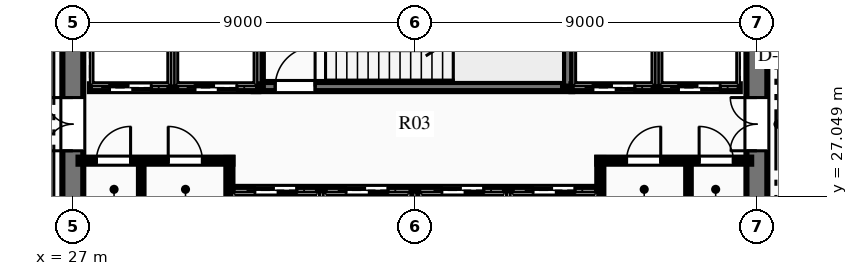
"""IFC4 building model, lengths in metres.
Left out: names, types, materials, properties, quantities, classifications, styles, units other than length and angle.
Written with IfcOpenShell. Run it as: python <this file> out.ifc"""

import sys

from ifc_helpers import new_model, si_unit, direction, frame, frame_2d, origin, place, context, subcontext, project, spatial, rectangle, extrude, element, fill, save


model = new_model("IFC4")
c1 = context("Model", 3, precision=1e-05, world=origin(), true_north=direction((0.0, 1.0)))
c2 = subcontext(c1, "Body", "Model", "MODEL_VIEW")
j1 = project(units=[si_unit("LENGTHUNIT", "METRE"), si_unit("PLANEANGLEUNIT", "RADIAN")], contexts=[c1])
p1 = place(None, origin())
s1 = spatial("IfcSite", under=j1, at=p1, CompositionType="ELEMENT")
p2 = place(p1, origin())
s2 = spatial("IfcBuilding", under=s1, at=p2, CompositionType="ELEMENT")
p3 = place(p2, frame((0.0, 0.0, 85.95)))
s3 = spatial("IfcBuildingStorey", under=s2, at=p3, CompositionType="ELEMENT", Elevation=85.95)
p4 = place(p3, frame((27.0, 18.275, 0.0), z_axis=(0.0, 0.0, 1.0), x_axis=(0.0, 1.0, 0.0)))
e1 = element("IfcWall", 1, at=p4, inside=s3, PredefinedType="SHEAR", context=c2, shape_type="SweptSolid", body=[
    extrude(rectangle(XDim=15.45, YDim=0.55, at=frame_2d((7.725, 0.0))), origin(), (0.0, 0.0, 1.0), 4.5),
])
p5 = place(p4, frame((9.965, 0.0, 0.0)))
e2 = element("IfcOpeningElement", 2, at=p5, cuts=e1, PredefinedType="OPENING", context=c2, shape_type="SweptSolid", body=[
    extrude(rectangle(XDim=1.4, YDim=2.2, at=frame_2d((0.7, 1.1))), frame((0.0, 0.285, 0.0), z_axis=(0.0, -1.0, 0.0), x_axis=(1.0, 0.0, 0.0)), (0.0, 0.0, 1.0), 0.57),
])
p6 = place(p3, frame((45.0, 18.275, 0.0), z_axis=(0.0, 0.0, 1.0), x_axis=(0.0, 1.0, 0.0)))
e3 = element("IfcWall", 3, at=p6, inside=s3, PredefinedType="SHEAR", context=c2, shape_type="SweptSolid", body=[
    extrude(rectangle(XDim=15.45, YDim=0.55, at=frame_2d((7.725, 0.0))), origin(), (0.0, 0.0, 1.0), 4.5),
])
p7 = place(p6, frame((9.965, 0.0, 0.0)))
e4 = element("IfcOpeningElement", 4, at=p7, cuts=e3, PredefinedType="OPENING", context=c2, shape_type="SweptSolid", body=[
    extrude(rectangle(XDim=1.4, YDim=2.2, at=frame_2d((0.7, 1.1))), frame((0.0, 0.285, 0.0), z_axis=(0.0, -1.0, 0.0), x_axis=(1.0, 0.0, 0.0)), (0.0, 0.0, 1.0), 0.57),
])
p8 = place(p3, frame((31.76, 29.93, 0.0), z_axis=(0.0, 0.0, 1.0), x_axis=(1.0, 0.0, 0.0)))
e5 = element("IfcWall", 5, at=p8, inside=s3, PredefinedType="SHEAR", context=c2, shape_type="SweptSolid", body=[
    extrude(rectangle(XDim=8.38, YDim=0.24, at=frame_2d((4.19, 0.0))), origin(), (0.0, 0.0, 1.0), 4.5),
])
p9 = place(p8, frame((0.565, 0.0, 0.0)))
e6 = element("IfcOpeningElement", 6, at=p9, cuts=e5, PredefinedType="OPENING", context=c2, shape_type="SweptSolid", body=[
    extrude(rectangle(XDim=1.05, YDim=2.15, at=frame_2d((0.525, 1.075))), frame((0.0, 0.13, 0.0), z_axis=(0.0, -1.0, 0.0), x_axis=(1.0, 0.0, 0.0)), (0.0, 0.0, 1.0), 0.26),
])
p10 = place(p3, frame((31.88, 29.93, 0.0), z_axis=(0.0, 0.0, 1.0), x_axis=(0.0, 1.0, 0.0)))
e7 = element("IfcWall", 7, at=p10, inside=s3, PredefinedType="SHEAR", context=c2, shape_type="SweptSolid", body=[
    extrude(rectangle(XDim=3.79, YDim=0.24, at=frame_2d((1.895, 0.0))), origin(), (0.0, 0.0, 1.0), 4.5),
])
p11 = place(p3, frame((40.02, 29.93, 0.0), z_axis=(0.0, 0.0, 1.0), x_axis=(0.0, 1.0, 0.0)))
e8 = element("IfcWall", 8, at=p11, inside=s3, PredefinedType="SHEAR", context=c2, shape_type="SweptSolid", body=[
    extrude(rectangle(XDim=3.85, YDim=0.24, at=frame_2d((1.925, 0.0))), origin(), (0.0, 0.0, 1.0), 4.5),
])
p12 = place(p3, frame((27.15, 27.98, 0.0), z_axis=(0.0, 0.0, 1.0), x_axis=(1.0, 0.0, 0.0)))
e9 = element("IfcWall", 9, at=p12, inside=s3, PredefinedType="PARTITIONING", context=c2, shape_type="SweptSolid", body=[
    extrude(rectangle(XDim=4.05, YDim=0.16, at=frame_2d((2.025, 0.0))), origin(), (0.0, 0.0, 1.0), 4.2),
])
p13 = place(p12, frame((0.47, 0.0, 0.0)))
e10 = element("IfcOpeningElement", 10, at=p13, cuts=e9, PredefinedType="OPENING", context=c2, shape_type="SweptSolid", body=[
    extrude(rectangle(XDim=0.9, YDim=2.15, at=frame_2d((0.45, 1.075))), frame((0.0, 0.09, 0.0), z_axis=(0.0, -1.0, 0.0), x_axis=(1.0, 0.0, 0.0)), (0.0, 0.0, 1.0), 0.18),
])
p14 = place(p12, frame((2.36, 0.0, 0.0)))
e11 = element("IfcOpeningElement", 11, at=p14, cuts=e9, PredefinedType="OPENING", context=c2, shape_type="SweptSolid", body=[
    extrude(rectangle(XDim=0.9, YDim=2.15, at=frame_2d((0.45, 1.075))), frame((0.0, 0.09, 0.0), z_axis=(0.0, -1.0, 0.0), x_axis=(1.0, 0.0, 0.0)), (0.0, 0.0, 1.0), 0.18),
])
p15 = place(p3, frame((31.12, 26.54, 0.0), z_axis=(0.0, 0.0, 1.0), x_axis=(0.0, 1.0, 0.0)))
e12 = element("IfcWall", 12, at=p15, inside=s3, PredefinedType="PARTITIONING", context=c2, shape_type="SweptSolid", body=[
    extrude(rectangle(XDim=1.51, YDim=0.16, at=frame_2d((0.755, 0.0))), origin(), (0.0, 0.0, 1.0), 4.2),
])
p16 = place(p3, frame((40.8, 27.98, 0.0), z_axis=(0.0, 0.0, 1.0), x_axis=(1.0, 0.0, 0.0)))
e13 = element("IfcWall", 13, at=p16, inside=s3, PredefinedType="PARTITIONING", context=c2, shape_type="SweptSolid", body=[
    extrude(rectangle(XDim=4.05, YDim=0.16, at=frame_2d((2.025, 0.0))), origin(), (0.0, 0.0, 1.0), 4.2),
])
p17 = place(p16, frame((0.77, 0.0, 0.0)))
e14 = element("IfcOpeningElement", 14, at=p17, cuts=e13, PredefinedType="OPENING", context=c2, shape_type="SweptSolid", body=[
    extrude(rectangle(XDim=0.9, YDim=2.15, at=frame_2d((0.45, 1.075))), frame((0.0, 0.09, 0.0), z_axis=(0.0, -1.0, 0.0), x_axis=(1.0, 0.0, 0.0)), (0.0, 0.0, 1.0), 0.18),
])
p18 = place(p16, frame((2.68, 0.0, 0.0)))
e15 = element("IfcOpeningElement", 15, at=p18, cuts=e13, PredefinedType="OPENING", context=c2, shape_type="SweptSolid", body=[
    extrude(rectangle(XDim=0.9, YDim=2.15, at=frame_2d((0.45, 1.075))), frame((0.0, 0.09, 0.0), z_axis=(0.0, -1.0, 0.0), x_axis=(1.0, 0.0, 0.0)), (0.0, 0.0, 1.0), 0.18),
])
p19 = place(p3, frame((40.88, 26.54, 0.0), z_axis=(0.0, 0.0, 1.0), x_axis=(0.0, 1.0, 0.0)))
e16 = element("IfcWall", 16, at=p19, inside=s3, PredefinedType="PARTITIONING", context=c2, shape_type="SweptSolid", body=[
    extrude(rectangle(XDim=1.51, YDim=0.16, at=frame_2d((0.755, 0.0))), origin(), (0.0, 0.0, 1.0), 4.2),
])
for number, where, z_axis, x_axis in (
    (17, (28.8, 26.54, 0.0), (0.0, 0.0, 1.0), (0.0, 1.0, 0.0)),
    (18, (43.2, 26.54, 0.0), (0.0, 0.0, 1.0), (0.0, 1.0, 0.0)),
):
    element("IfcWall", number, at=place(p3, frame(where, z_axis=z_axis, x_axis=x_axis)), inside=s3, PredefinedType="PARTITIONING", context=c2, shape_type="SweptSolid", body=[
        extrude(rectangle(XDim=1.44, YDim=0.12, at=frame_2d((0.72, 0.0))), origin(), (0.0, 0.0, 1.0), 4.2),
    ])
p20 = place(p3, frame((27.45, 29.9, 0.0), z_axis=(0.0, 0.0, 1.0), x_axis=(1.0, 0.0, 0.0)))
e19 = element("IfcWall", 19, at=p20, inside=s3, PredefinedType="PARTITIONING", context=c2, shape_type="SweptSolid", body=[
    extrude(rectangle(XDim=4.43, YDim=0.18, at=frame_2d((2.215, 0.0))), origin(), (0.0, 0.0, 1.0), 4.2),
])
p21 = place(p20, frame((0.515, 0.0, 0.0)))
e20 = element("IfcOpeningElement", 20, at=p21, cuts=e19, PredefinedType="OPENING", context=c2, shape_type="SweptSolid", body=[
    extrude(rectangle(XDim=1.1, YDim=2.15, at=frame_2d((0.55, 1.075))), frame((0.0, 0.1, 0.0), z_axis=(0.0, -1.0, 0.0), x_axis=(1.0, 0.0, 0.0)), (0.0, 0.0, 1.0), 0.2),
])
p22 = place(p20, frame((2.765, 0.0, 0.0)))
e21 = element("IfcOpeningElement", 21, at=p22, cuts=e19, PredefinedType="OPENING", context=c2, shape_type="SweptSolid", body=[
    extrude(rectangle(XDim=1.1, YDim=2.15, at=frame_2d((0.55, 1.075))), frame((0.0, 0.1, 0.0), z_axis=(0.0, -1.0, 0.0), x_axis=(1.0, 0.0, 0.0)), (0.0, 0.0, 1.0), 0.2),
])
p23 = place(p3, frame((29.63, 29.9, 0.0), z_axis=(0.0, 0.0, 1.0), x_axis=(0.0, 1.0, 0.0)))
e22 = element("IfcWall", 22, at=p23, inside=s3, PredefinedType="PARTITIONING", context=c2, shape_type="SweptSolid", body=[
    extrude(rectangle(XDim=3.75, YDim=0.18, at=frame_2d((1.875, 0.0))), origin(), (0.0, 0.0, 1.0), 4.2),
])
p24 = place(p3, frame((40.12, 29.9, 0.0), z_axis=(0.0, 0.0, 1.0), x_axis=(1.0, 0.0, 0.0)))
e23 = element("IfcWall", 23, at=p24, inside=s3, PredefinedType="PARTITIONING", context=c2, shape_type="SweptSolid", body=[
    extrude(rectangle(XDim=4.43, YDim=0.18, at=frame_2d((2.215, 0.0))), origin(), (0.0, 0.0, 1.0), 4.2),
])
p25 = place(p24, frame((0.565, 0.0, 0.0)))
e24 = element("IfcOpeningElement", 24, at=p25, cuts=e23, PredefinedType="OPENING", context=c2, shape_type="SweptSolid", body=[
    extrude(rectangle(XDim=1.1, YDim=2.15, at=frame_2d((0.55, 1.075))), frame((0.0, 0.1, 0.0), z_axis=(0.0, -1.0, 0.0), x_axis=(1.0, 0.0, 0.0)), (0.0, 0.0, 1.0), 0.2),
])
p26 = place(p24, frame((2.815, 0.0, 0.0)))
e25 = element("IfcOpeningElement", 25, at=p26, cuts=e23, PredefinedType="OPENING", context=c2, shape_type="SweptSolid", body=[
    extrude(rectangle(XDim=1.1, YDim=2.15, at=frame_2d((0.55, 1.075))), frame((0.0, 0.1, 0.0), z_axis=(0.0, -1.0, 0.0), x_axis=(1.0, 0.0, 0.0)), (0.0, 0.0, 1.0), 0.2),
])
p27 = place(p3, frame((42.37, 29.9, 0.0), z_axis=(0.0, 0.0, 1.0), x_axis=(0.0, 1.0, 0.0)))
e26 = element("IfcWall", 26, at=p27, inside=s3, PredefinedType="PARTITIONING", context=c2, shape_type="SweptSolid", body=[
    extrude(rectangle(XDim=3.75, YDim=0.18, at=frame_2d((1.875, 0.0))), origin(), (0.0, 0.0, 1.0), 4.2),
])
p28 = place(p3, frame((31.2, 27.2, 0.0), z_axis=(0.0, 0.0, 1.0), x_axis=(1.0, 0.0, 0.0)))
e27 = element("IfcWall", 27, at=p28, inside=s3, PredefinedType="PARTITIONING", context=c2, shape_type="SweptSolid", body=[
    extrude(rectangle(XDim=9.6, YDim=0.18, at=frame_2d((4.8, 0.0))), origin(), (0.0, 0.0, 1.0), 4.2),
])
p29 = place(p28, frame((0.59, 0.0, 0.0)))
e28 = element("IfcOpeningElement", 28, at=p29, cuts=e27, PredefinedType="OPENING", context=c2, shape_type="SweptSolid", body=[
    extrude(rectangle(XDim=1.1, YDim=2.15, at=frame_2d((0.55, 1.075))), frame((0.0, 0.1, 0.0), z_axis=(0.0, -1.0, 0.0), x_axis=(1.0, 0.0, 0.0)), (0.0, 0.0, 1.0), 0.2),
])
p30 = place(p28, frame((2.99, 0.0, 0.0)))
e29 = element("IfcOpeningElement", 29, at=p30, cuts=e27, PredefinedType="OPENING", context=c2, shape_type="SweptSolid", body=[
    extrude(rectangle(XDim=1.1, YDim=2.15, at=frame_2d((0.55, 1.075))), frame((0.0, 0.1, 0.0), z_axis=(0.0, -1.0, 0.0), x_axis=(1.0, 0.0, 0.0)), (0.0, 0.0, 1.0), 0.2),
])
p31 = place(p28, frame((5.51, 0.0, 0.0)))
e30 = element("IfcOpeningElement", 30, at=p31, cuts=e27, PredefinedType="OPENING", context=c2, shape_type="SweptSolid", body=[
    extrude(rectangle(XDim=1.1, YDim=2.15, at=frame_2d((0.55, 1.075))), frame((0.0, 0.1, 0.0), z_axis=(0.0, -1.0, 0.0), x_axis=(1.0, 0.0, 0.0)), (0.0, 0.0, 1.0), 0.2),
])
p32 = place(p28, frame((7.91, 0.0, 0.0)))
e31 = element("IfcOpeningElement", 31, at=p32, cuts=e27, PredefinedType="OPENING", context=c2, shape_type="SweptSolid", body=[
    extrude(rectangle(XDim=1.1, YDim=2.15, at=frame_2d((0.55, 1.075))), frame((0.0, 0.1, 0.0), z_axis=(0.0, -1.0, 0.0), x_axis=(1.0, 0.0, 0.0)), (0.0, 0.0, 1.0), 0.2),
])
for number, where, z_axis, x_axis in (
    (32, (33.54, 25.3, 0.0), (0.0, 0.0, 1.0), (0.0, 1.0, 0.0)),
    (33, (36.0, 25.3, 0.0), (0.0, 0.0, 1.0), (0.0, 1.0, 0.0)),
    (34, (38.46, 25.3, 0.0), (0.0, 0.0, 1.0), (0.0, 1.0, 0.0)),
):
    element("IfcWall", number, at=place(p3, frame(where, z_axis=z_axis, x_axis=x_axis)), inside=s3, PredefinedType="PARTITIONING", context=c2, shape_type="SweptSolid", body=[
        extrude(rectangle(XDim=1.9, YDim=0.18, at=frame_2d((0.95, 0.0))), origin(), (0.0, 0.0, 1.0), 4.2),
    ])
p33 = place(p13, origin())
e35 = element("IfcDoor", 35, at=p33, inside=s3, OperationType="SINGLE_SWING_RIGHT", PredefinedType="DOOR", context=c2, shape_type="SweptSolid", body=[
    extrude(rectangle(XDim=0.9, YDim=2.15, at=frame_2d((0.45, 1.075))), frame((0.0, 0.025, 0.0), z_axis=(0.0, -1.0, 0.0), x_axis=(1.0, 0.0, 0.0)), (0.0, 0.0, 1.0), 0.05),
])
fill(e10, e35)
p34 = place(p14, origin())
e36 = element("IfcDoor", 36, at=p34, inside=s3, OperationType="SINGLE_SWING_LEFT", PredefinedType="DOOR", context=c2, shape_type="SweptSolid", body=[
    extrude(rectangle(XDim=0.9, YDim=2.15, at=frame_2d((0.45, 1.075))), frame((0.0, 0.025, 0.0), z_axis=(0.0, -1.0, 0.0), x_axis=(1.0, 0.0, 0.0)), (0.0, 0.0, 1.0), 0.05),
])
fill(e11, e36)
p35 = place(p17, origin())
e37 = element("IfcDoor", 37, at=p35, inside=s3, OperationType="SINGLE_SWING_RIGHT", PredefinedType="DOOR", context=c2, shape_type="SweptSolid", body=[
    extrude(rectangle(XDim=0.9, YDim=2.15, at=frame_2d((0.45, 1.075))), frame((0.0, 0.025, 0.0), z_axis=(0.0, -1.0, 0.0), x_axis=(1.0, 0.0, 0.0)), (0.0, 0.0, 1.0), 0.05),
])
fill(e14, e37)
p36 = place(p18, origin())
e38 = element("IfcDoor", 38, at=p36, inside=s3, OperationType="SINGLE_SWING_LEFT", PredefinedType="DOOR", context=c2, shape_type="SweptSolid", body=[
    extrude(rectangle(XDim=0.9, YDim=2.15, at=frame_2d((0.45, 1.075))), frame((0.0, 0.025, 0.0), z_axis=(0.0, -1.0, 0.0), x_axis=(1.0, 0.0, 0.0)), (0.0, 0.0, 1.0), 0.05),
])
fill(e15, e38)
p37 = place(p9, origin())
e39 = element("IfcDoor", 39, at=p37, inside=s3, OperationType="SINGLE_SWING_RIGHT", PredefinedType="DOOR", context=c2, shape_type="SweptSolid", body=[
    extrude(rectangle(XDim=1.05, YDim=2.15, at=frame_2d((0.525, 1.075))), frame((0.0, 0.025, 0.0), z_axis=(0.0, -1.0, 0.0), x_axis=(1.0, 0.0, 0.0)), (0.0, 0.0, 1.0), 0.05),
])
fill(e6, e39)
p38 = place(p5, origin())
e40 = element("IfcDoor", 40, at=p38, inside=s3, OperationType="DOUBLE_DOOR_SINGLE_SWING", PredefinedType="DOOR", context=c2, shape_type="SweptSolid", body=[
    extrude(rectangle(XDim=1.4, YDim=2.2, at=frame_2d((0.7, 1.1))), frame((0.0, 0.025, 0.0), z_axis=(0.0, -1.0, 0.0), x_axis=(1.0, 0.0, 0.0)), (0.0, 0.0, 1.0), 0.05),
])
fill(e2, e40)
p39 = place(p7, origin())
e41 = element("IfcDoor", 41, at=p39, inside=s3, OperationType="DOUBLE_DOOR_SINGLE_SWING", PredefinedType="DOOR", context=c2, shape_type="SweptSolid", body=[
    extrude(rectangle(XDim=1.4, YDim=2.2, at=frame_2d((0.7, 1.1))), frame((0.0, 0.025, 0.0), z_axis=(0.0, -1.0, 0.0), x_axis=(1.0, 0.0, 0.0)), (0.0, 0.0, 1.0), 0.05),
])
fill(e4, e41)
p40 = place(p21, origin())
e42 = element("IfcDoor", 42, at=p40, inside=s3, OperationType="SLIDING_TO_LEFT", PredefinedType="DOOR", context=c2, shape_type="SweptSolid", body=[
    extrude(rectangle(XDim=1.1, YDim=2.15, at=frame_2d((0.55, 1.075))), frame((0.0, 0.025, 0.0), z_axis=(0.0, -1.0, 0.0), x_axis=(1.0, 0.0, 0.0)), (0.0, 0.0, 1.0), 0.05),
])
fill(e20, e42)
p41 = place(p22, origin())
e43 = element("IfcDoor", 43, at=p41, inside=s3, OperationType="SLIDING_TO_LEFT", PredefinedType="DOOR", context=c2, shape_type="SweptSolid", body=[
    extrude(rectangle(XDim=1.1, YDim=2.15, at=frame_2d((0.55, 1.075))), frame((0.0, 0.025, 0.0), z_axis=(0.0, -1.0, 0.0), x_axis=(1.0, 0.0, 0.0)), (0.0, 0.0, 1.0), 0.05),
])
fill(e21, e43)
p42 = place(p25, origin())
e44 = element("IfcDoor", 44, at=p42, inside=s3, OperationType="SLIDING_TO_LEFT", PredefinedType="DOOR", context=c2, shape_type="SweptSolid", body=[
    extrude(rectangle(XDim=1.1, YDim=2.15, at=frame_2d((0.55, 1.075))), frame((0.0, 0.025, 0.0), z_axis=(0.0, -1.0, 0.0), x_axis=(1.0, 0.0, 0.0)), (0.0, 0.0, 1.0), 0.05),
])
fill(e24, e44)
p43 = place(p26, origin())
e45 = element("IfcDoor", 45, at=p43, inside=s3, OperationType="SLIDING_TO_LEFT", PredefinedType="DOOR", context=c2, shape_type="SweptSolid", body=[
    extrude(rectangle(XDim=1.1, YDim=2.15, at=frame_2d((0.55, 1.075))), frame((0.0, 0.025, 0.0), z_axis=(0.0, -1.0, 0.0), x_axis=(1.0, 0.0, 0.0)), (0.0, 0.0, 1.0), 0.05),
])
fill(e25, e45)
p44 = place(p29, origin())
e46 = element("IfcDoor", 46, at=p44, inside=s3, OperationType="SLIDING_TO_LEFT", PredefinedType="DOOR", context=c2, shape_type="SweptSolid", body=[
    extrude(rectangle(XDim=1.1, YDim=2.15, at=frame_2d((0.55, 1.075))), frame((0.0, 0.025, 0.0), z_axis=(0.0, -1.0, 0.0), x_axis=(1.0, 0.0, 0.0)), (0.0, 0.0, 1.0), 0.05),
])
fill(e28, e46)
p45 = place(p30, origin())
e47 = element("IfcDoor", 47, at=p45, inside=s3, OperationType="SLIDING_TO_LEFT", PredefinedType="DOOR", context=c2, shape_type="SweptSolid", body=[
    extrude(rectangle(XDim=1.1, YDim=2.15, at=frame_2d((0.55, 1.075))), frame((0.0, 0.025, 0.0), z_axis=(0.0, -1.0, 0.0), x_axis=(1.0, 0.0, 0.0)), (0.0, 0.0, 1.0), 0.05),
])
fill(e29, e47)
p46 = place(p31, origin())
e48 = element("IfcDoor", 48, at=p46, inside=s3, OperationType="SLIDING_TO_LEFT", PredefinedType="DOOR", context=c2, shape_type="SweptSolid", body=[
    extrude(rectangle(XDim=1.1, YDim=2.15, at=frame_2d((0.55, 1.075))), frame((0.0, 0.025, 0.0), z_axis=(0.0, -1.0, 0.0), x_axis=(1.0, 0.0, 0.0)), (0.0, 0.0, 1.0), 0.05),
])
fill(e30, e48)
p47 = place(p32, origin())
e49 = element("IfcDoor", 49, at=p47, inside=s3, OperationType="SLIDING_TO_LEFT", PredefinedType="DOOR", context=c2, shape_type="SweptSolid", body=[
    extrude(rectangle(XDim=1.1, YDim=2.15, at=frame_2d((0.55, 1.075))), frame((0.0, 0.025, 0.0), z_axis=(0.0, -1.0, 0.0), x_axis=(1.0, 0.0, 0.0)), (0.0, 0.0, 1.0), 0.05),
])
fill(e31, e49)
save(model, sys.argv[1])
